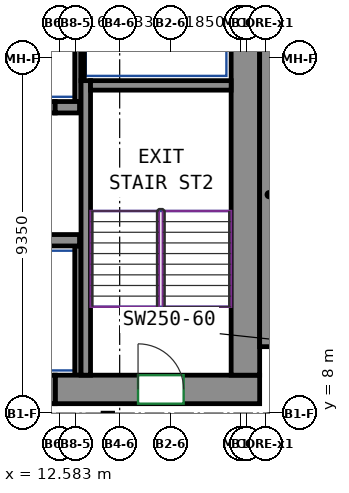
"""IFC4 building model, lengths in metres.
Left out: names, types, materials, properties, quantities, classifications, styles, units other than length and angle.
Written with IfcOpenShell. Run it as: python <this file> out.ifc"""

import sys

from ifc_helpers import new_model, si_unit, direction, frame, frame_2d, origin, place, context, subcontext, project, spatial, rectangle, extrude, source, transform, mapped, element, fill, save


model = new_model("IFC4")
c1 = context("Model", 3, precision=1e-05, world=origin(), true_north=direction((0.0, 1.0)))
c2 = subcontext(c1, "Body", "Model", "MODEL_VIEW")
j1 = project(units=[si_unit("LENGTHUNIT", "METRE"), si_unit("PLANEANGLEUNIT", "RADIAN")], contexts=[c1])
p1 = place(None, origin())
s1 = spatial("IfcSite", under=j1, at=p1, CompositionType="ELEMENT")
p2 = place(p1, origin())
s2 = spatial("IfcBuilding", under=s1, at=p2, CompositionType="ELEMENT")
p3 = place(p2, frame((0.0, 0.0, 182.1)))
s3 = spatial("IfcBuildingStorey", under=s2, at=p3, CompositionType="ELEMENT", Elevation=182.1)
m1 = source(origin(), c2, "Body", "SweptSolid", [
    extrude(rectangle(XDim=5.38, YDim=0.75, at=frame_2d((2.69, 0.0))), origin(), (0.0, 0.0, 1.0), 3.12),
])
p4 = place(p3, frame((12.47, 8.625, 0.0), z_axis=(0.0, 0.0, 1.0), x_axis=(1.0, 0.0, 0.0)))
e1 = element("IfcWall", 1, at=p4, inside=s3, PredefinedType="SHEAR", context=c2, shape_type="MappedRepresentation", body=[
    mapped(m1, transform((0.0, 0.0, 0.0))),
])
p5 = place(p4, frame((2.18, 0.0, 0.0)))
e2 = element("IfcOpeningElement", 2, at=p5, cuts=e1, PredefinedType="OPENING", context=c2, shape_type="SweptSolid", body=[
    extrude(rectangle(XDim=1.2, YDim=2.1, at=frame_2d((0.6, 1.05))), frame((0.0, 0.385, 0.0), z_axis=(0.0, -1.0, 0.0), x_axis=(1.0, 0.0, 0.0)), (0.0, 0.0, 1.0), 0.77),
])
m2 = source(origin(), c2, "Body", "SweptSolid", [
    extrude(rectangle(XDim=12.0, YDim=0.75, at=frame_2d((6.0, 0.0))), origin(), (0.0, 0.0, 1.0), 3.12),
])
p6 = place(p3, frame((17.475, 9.0, 0.0), z_axis=(0.0, 0.0, 1.0), x_axis=(0.0, 1.0, 0.0)))
e3 = element("IfcWall", 3, at=p6, inside=s3, PredefinedType="SHEAR", context=c2, shape_type="MappedRepresentation", body=[
    mapped(m2, transform((0.0, 0.0, 0.0))),
])
m3 = source(origin(), c2, "Body", "SweptSolid", [
    extrude(rectangle(XDim=7.75, YDim=0.25, at=frame_2d((3.875, 0.0))), origin(), (0.0, 0.0, 1.0), 3.12),
])
p7 = place(p3, frame((13.275, 9.0, 0.0), z_axis=(0.0, 0.0, 1.0), x_axis=(0.0, 1.0, 0.0)))
e4 = element("IfcWall", 4, at=p7, inside=s3, PredefinedType="SHEAR", context=c2, shape_type="MappedRepresentation", body=[
    mapped(m3, transform((0.0, 0.0, 0.0))),
])
m4 = source(origin(), c2, "Body", "SweptSolid", [
    extrude(rectangle(XDim=3.7, YDim=0.25, at=frame_2d((1.85, 0.0))), origin(), (0.0, 0.0, 1.0), 3.12),
])
p8 = place(p3, frame((13.4, 16.625, 0.0), z_axis=(0.0, 0.0, 1.0), x_axis=(1.0, 0.0, 0.0)))
e5 = element("IfcWall", 5, at=p8, inside=s3, PredefinedType="SHEAR", context=c2, shape_type="MappedRepresentation", body=[
    mapped(m4, transform((0.0, 0.0, 0.0))),
])
m5 = source(origin(), c2, "Body", "SweptSolid", [
    extrude(rectangle(XDim=8.0, YDim=0.5, at=frame_2d((4.0, 0.0))), origin(), (0.0, 0.0, 1.0), 3.12),
])
p9 = place(p3, frame((18.1, 9.75, 0.0), z_axis=(0.0, 0.0, 1.0), x_axis=(0.0, 1.0, 0.0)))
e6 = element("IfcWall", 6, at=p9, inside=s3, PredefinedType="SHEAR", context=c2, shape_type="MappedRepresentation", body=[
    mapped(m5, transform((0.0, 0.0, 0.0))),
])
m6 = source(origin(), c2, "Body", "SweptSolid", [
    extrude(rectangle(XDim=2.82, YDim=0.3, at=frame_2d((1.41, 0.0))), origin(), (0.0, 0.0, 1.0), 3.12),
])
p10 = place(p3, frame((10.29, 12.55, 0.0), z_axis=(0.0, 0.0, 1.0), x_axis=(1.0, 0.0, 0.0)))
e7 = element("IfcWall", 7, at=p10, inside=s3, PredefinedType="SHEAR", context=c2, shape_type="MappedRepresentation", body=[
    mapped(m6, transform((0.0, 0.0, 0.0))),
])
m7 = source(origin(), c2, "Body", "SweptSolid", [
    extrude(rectangle(XDim=0.64, YDim=0.3, at=frame_2d((0.32, 0.0))), origin(), (0.0, 0.0, 1.0), 3.12),
])
p11 = place(p3, frame((12.47, 16.05, 0.0), z_axis=(0.0, 0.0, 1.0), x_axis=(1.0, 0.0, 0.0)))
e8 = element("IfcWall", 8, at=p11, inside=s3, PredefinedType="SHEAR", context=c2, shape_type="MappedRepresentation", body=[
    mapped(m7, transform((0.0, 0.0, 0.0))),
])
m8 = source(origin(), c2, "Body", "SweptSolid", [
    extrude(rectangle(XDim=1.4, YDim=0.3, at=frame_2d((0.7, 0.0))), origin(), (0.0, 0.0, 1.0), 3.12),
])
p12 = place(p3, frame((11.07, 16.05, 0.0), z_axis=(0.0, 0.0, 1.0), x_axis=(1.0, 0.0, 0.0)))
e9 = element("IfcWall", 9, at=p12, inside=s3, PredefinedType="PARTITIONING", context=c2, shape_type="MappedRepresentation", body=[
    mapped(m8, transform((0.0, 0.0, 0.0))),
])
p13 = place(p12, frame((0.15, 0.0, 0.0)))
e10 = element("IfcOpeningElement", 10, at=p13, cuts=e9, PredefinedType="OPENING", context=c2, shape_type="SweptSolid", body=[
    extrude(rectangle(XDim=1.1, YDim=2.1, at=frame_2d((0.55, 1.05))), frame((0.0, 0.16, 0.0), z_axis=(0.0, -1.0, 0.0), x_axis=(1.0, 0.0, 0.0)), (0.0, 0.0, 1.0), 0.32),
])
m9 = source(origin(), c2, "Body", "SweptSolid", [
    extrude(rectangle(XDim=3.275, YDim=0.165, at=frame_2d((1.638, 0.0))), origin(), (0.0, 0.0, 1.0), 3.12),
])
p14 = place(p3, frame((13.067, 16.2, 0.0), z_axis=(0.0, 0.0, 1.0), x_axis=(0.0, 1.0, 0.0)))
e11 = element("IfcWall", 11, at=p14, inside=s3, PredefinedType="PARTITIONING", context=c2, shape_type="MappedRepresentation", body=[
    mapped(m9, transform((0.0, 0.0, 0.0))),
])
m10 = source(origin(), c2, "Body", "SweptSolid", [
    extrude(rectangle(XDim=2.725, YDim=0.085, at=frame_2d((1.363, 0.0))), origin(), (0.0, 0.0, 1.0), 3.12),
])
p15 = place(p3, frame((13.192, 16.75, 0.0), z_axis=(0.0, 0.0, 1.0), x_axis=(0.0, 1.0, 0.0)))
e12 = element("IfcWall", 12, at=p15, inside=s3, PredefinedType="PARTITIONING", context=c2, shape_type="MappedRepresentation", body=[
    mapped(m10, transform((0.0, 0.0, 0.0))),
])
m11 = source(origin(), c2, "Body", "SweptSolid", [
    extrude(rectangle(XDim=3.4, YDim=0.165, at=frame_2d((1.7, 0.0))), origin(), (0.0, 0.0, 1.0), 3.12),
])
p16 = place(p3, frame((13.067, 9.0, 0.0), z_axis=(0.0, 0.0, 1.0), x_axis=(0.0, 1.0, 0.0)))
e13 = element("IfcWall", 13, at=p16, inside=s3, PredefinedType="PARTITIONING", context=c2, shape_type="MappedRepresentation", body=[
    mapped(m11, transform((0.0, 0.0, 0.0))),
])
m12 = source(origin(), c2, "Body", "SweptSolid", [
    extrude(rectangle(XDim=1.4, YDim=0.75, at=frame_2d((0.7, 0.0))), origin(), (0.0, 0.0, 1.0), 2.7),
])
p17 = place(p3, frame((11.07, 8.625, 0.0), z_axis=(0.0, 0.0, 1.0), x_axis=(1.0, 0.0, 0.0)))
e14 = element("IfcWall", 14, at=p17, inside=s3, PredefinedType="PARTITIONING", context=c2, shape_type="MappedRepresentation", body=[
    mapped(m12, transform((0.0, 0.0, 0.0))),
])
p18 = place(p17, frame((0.25, 0.0, 0.0)))
e15 = element("IfcOpeningElement", 15, at=p18, cuts=e14, PredefinedType="OPENING", context=c2, shape_type="SweptSolid", body=[
    extrude(rectangle(XDim=0.9, YDim=2.1, at=frame_2d((0.45, 1.05))), frame((0.0, 0.385, 0.0), z_axis=(0.0, -1.0, 0.0), x_axis=(1.0, 0.0, 0.0)), (0.0, 0.0, 1.0), 0.77),
])
p19 = place(p5, origin())
e16 = element("IfcDoor", 16, at=p19, inside=s3, OperationType="DOUBLE_DOOR_SINGLE_SWING", PredefinedType="DOOR", context=c2, shape_type="SweptSolid", body=[
    extrude(rectangle(XDim=1.2, YDim=2.1, at=frame_2d((0.6, 1.05))), frame((0.0, 0.28, 0.0), z_axis=(0.0, -1.0, 0.0), x_axis=(1.0, 0.0, 0.0)), (0.0, 0.0, 1.0), 0.05),
])
fill(e2, e16)
save(model, sys.argv[1])
